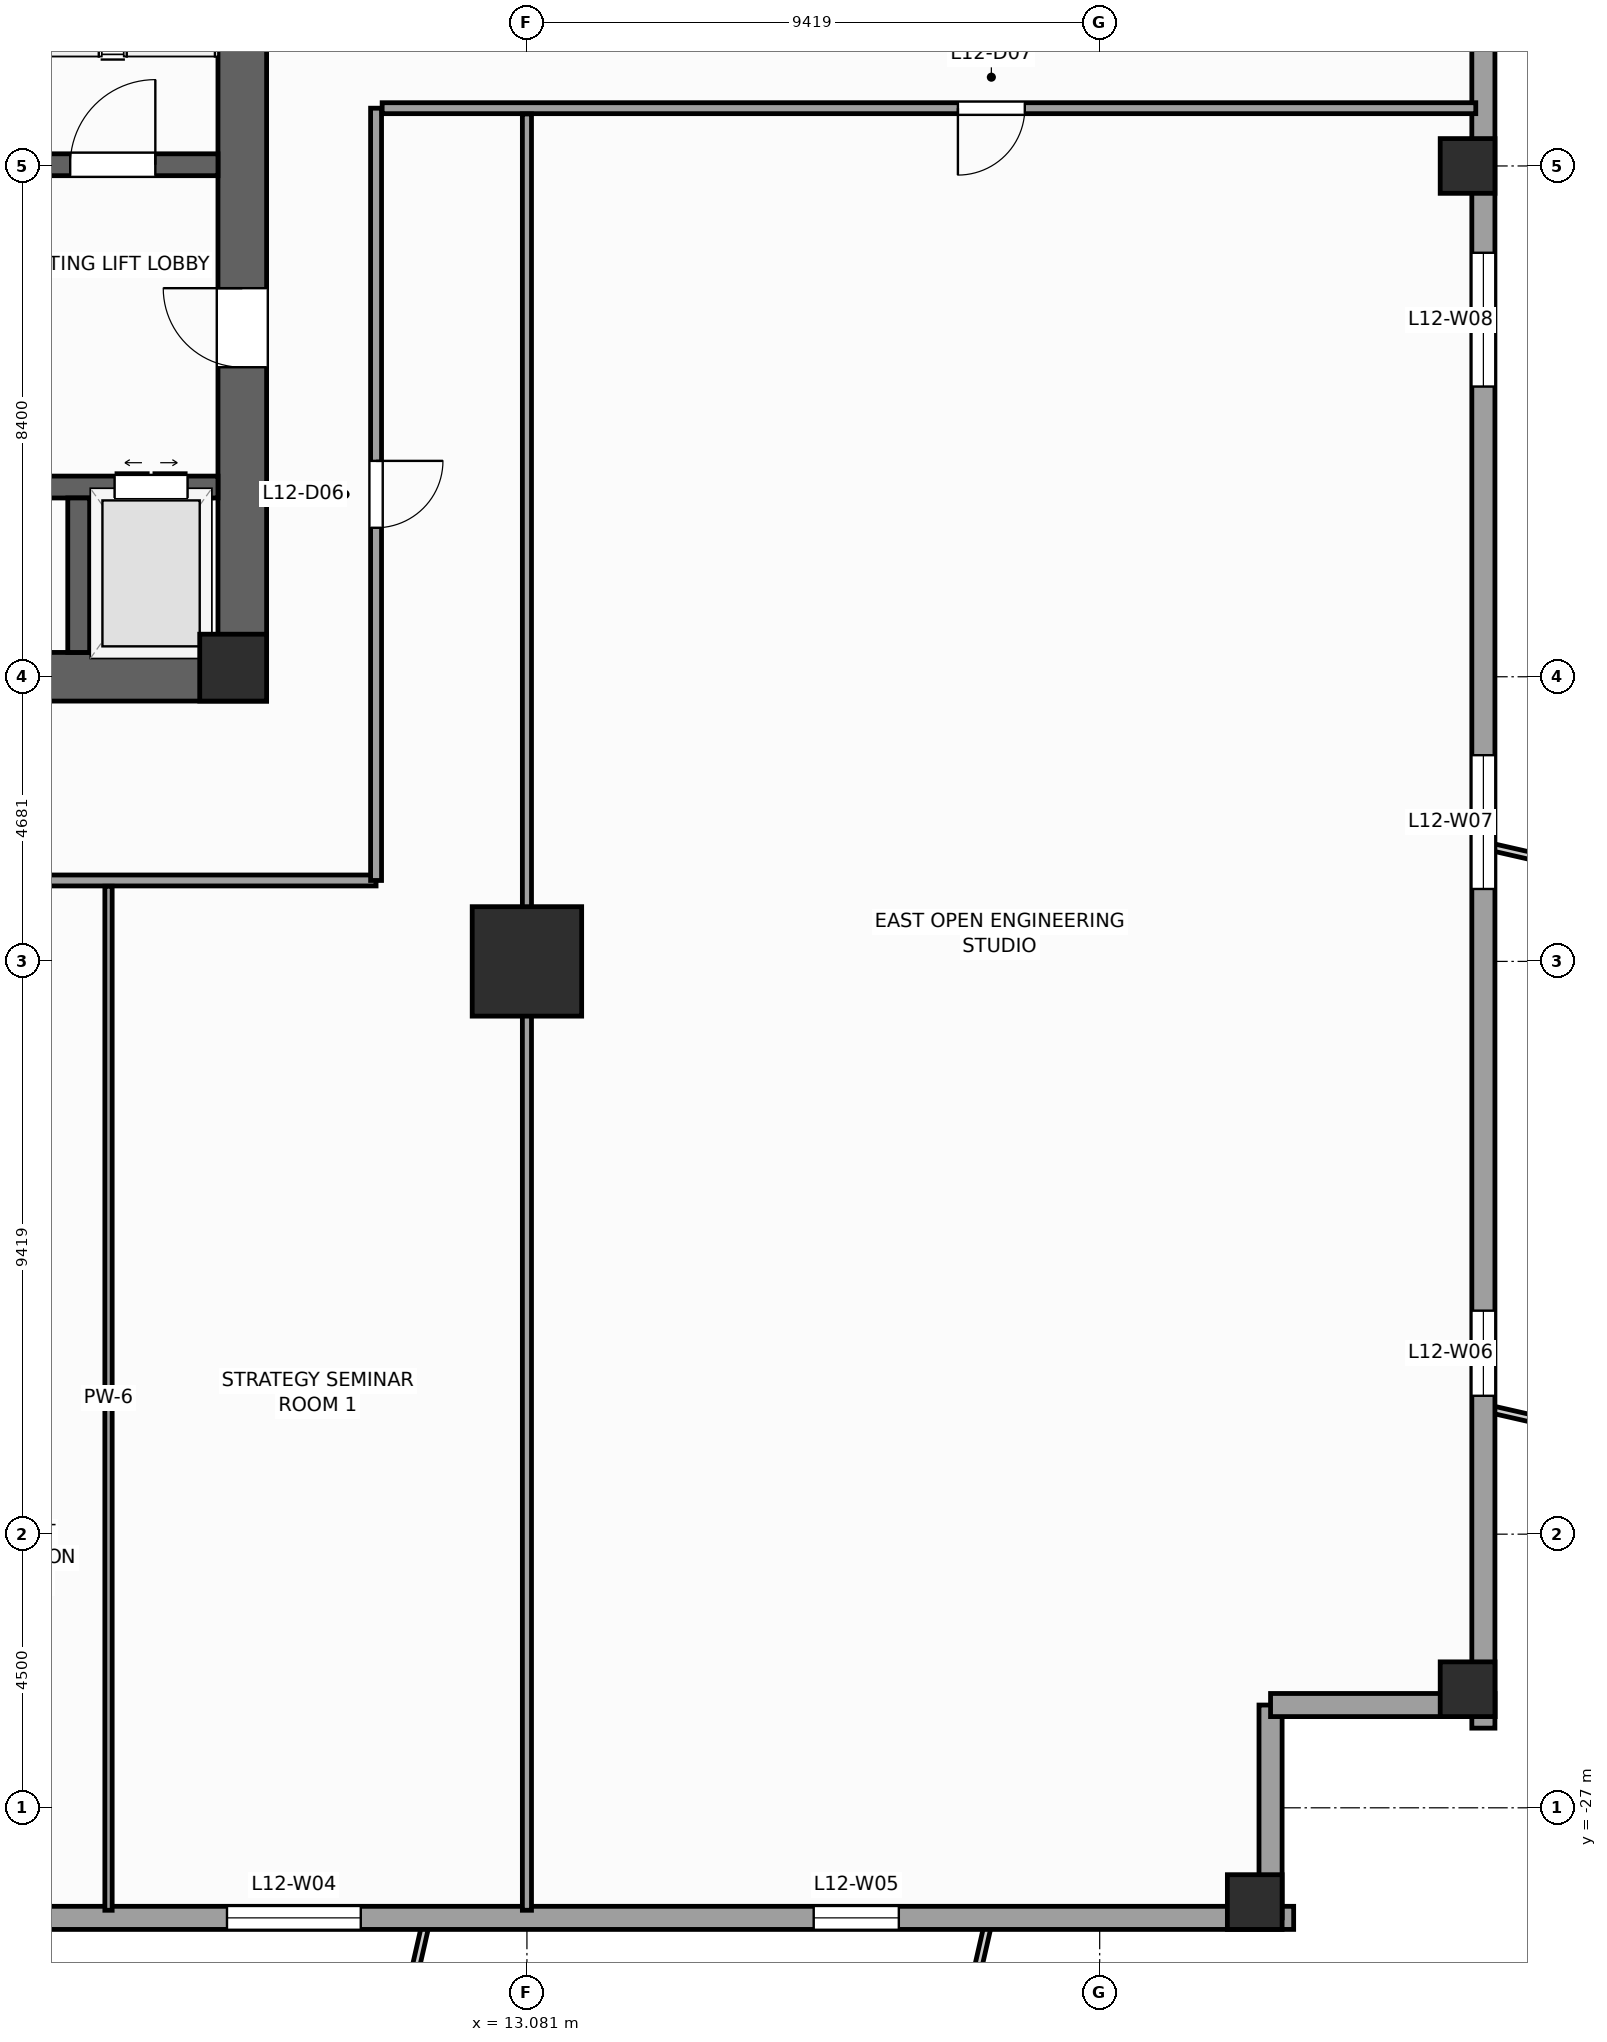
"""IFC4 building model, lengths in metres.
Left out: names, types, materials, properties, quantities, classifications, styles, units other than length and angle.
Written with IfcOpenShell. Run it as: python <this file> out.ifc"""

import sys

from ifc_helpers import new_model, si_unit, direction, frame, frame_2d, origin, origin_2d, place, context, subcontext, project, spatial, rectangle, extrude, source, transform, mapped, element, fill, save


model = new_model("IFC4")
c1 = context("Model", 3, precision=1e-05, world=origin(), true_north=direction((0.0, 1.0)))
c2 = subcontext(c1, "Body", "Model", "MODEL_VIEW")
j1 = project(units=[si_unit("LENGTHUNIT", "METRE"), si_unit("PLANEANGLEUNIT", "RADIAN")], contexts=[c1])
p1 = place(None, origin())
s1 = spatial("IfcSite", under=j1, at=p1, CompositionType="ELEMENT")
p2 = place(p1, origin())
s2 = spatial("IfcBuilding", under=s1, at=p2, CompositionType="ELEMENT")
p3 = place(p2, frame((0.0, 0.0, 54.0)))
s3 = spatial("IfcBuildingStorey", under=s2, at=p3, CompositionType="ELEMENT", Elevation=54.0)
p4 = place(p3, frame((-8.8, -8.4, 0.0), z_axis=(0.0, 0.0, 1.0), x_axis=(1.0, 0.0, 0.0)))
e1 = element("IfcWall", 1, at=p4, inside=s3, PredefinedType="SHEAR", context=c2, shape_type="SweptSolid", body=[
    extrude(rectangle(XDim=17.6, YDim=0.8, at=frame_2d((8.8, 0.0))), origin(), (0.0, 0.0, 1.0), 4.0),
])
p5 = place(p4, frame((8.15, 0.0, 0.0)))
e2 = element("IfcOpeningElement", 2, at=p5, cuts=e1, PredefinedType="OPENING", context=c2, shape_type="SweptSolid", body=[
    extrude(rectangle(XDim=1.3, YDim=2.2, at=frame_2d((0.65, 1.1))), frame((0.0, 0.41, 0.0), z_axis=(0.0, -1.0, 0.0), x_axis=(1.0, 0.0, 0.0)), (0.0, 0.0, 1.0), 0.82),
])
p6 = place(p3, frame((8.4, -8.0, 0.0), z_axis=(0.0, 0.0, 1.0), x_axis=(0.0, 1.0, 0.0)))
e3 = element("IfcWall", 3, at=p6, inside=s3, PredefinedType="SHEAR", context=c2, shape_type="SweptSolid", body=[
    extrude(rectangle(XDim=16.0, YDim=0.8, at=frame_2d((8.0, 0.0))), origin(), (0.0, 0.0, 1.0), 4.0),
])
p7 = place(p6, frame((4.69, 0.0, 0.0)))
e4 = element("IfcOpeningElement", 4, at=p7, cuts=e3, PredefinedType="OPENING", context=c2, shape_type="SweptSolid", body=[
    extrude(rectangle(XDim=1.3, YDim=2.2, at=frame_2d((0.65, 1.1))), frame((0.0, 0.41, 0.0), z_axis=(0.0, -1.0, 0.0), x_axis=(1.0, 0.0, 0.0)), (0.0, 0.0, 1.0), 0.82),
])
p8 = place(p3, frame((4.54, 0.02, 0.0), z_axis=(0.0, 0.0, 1.0), x_axis=(1.0, 0.0, 0.0)))
e5 = element("IfcWall", 5, at=p8, inside=s3, PredefinedType="SHEAR", context=c2, shape_type="SweptSolid", body=[
    extrude(rectangle(XDim=3.46, YDim=0.36, at=frame_2d((1.73, 0.0))), origin(), (0.0, 0.0, 1.0), 4.0),
])
p9 = place(p8, frame((1.03, 0.0, 0.0)))
e6 = element("IfcOpeningElement", 6, at=p9, cuts=e5, PredefinedType="OPENING", context=c2, shape_type="SweptSolid", body=[
    extrude(rectangle(XDim=1.4, YDim=2.2, at=frame_2d((0.7, 1.1))), frame((0.0, 0.19, 0.0), z_axis=(0.0, -1.0, 0.0), x_axis=(1.0, 0.0, 0.0)), (0.0, 0.0, 1.0), 0.38),
])
p10 = place(p3, frame((4.54, -5.28, 0.0), z_axis=(0.0, 0.0, 1.0), x_axis=(1.0, 0.0, 0.0)))
e7 = element("IfcWall", 7, at=p10, inside=s3, PredefinedType="SHEAR", context=c2, shape_type="SweptSolid", body=[
    extrude(rectangle(XDim=3.46, YDim=0.36, at=frame_2d((1.73, 0.0))), origin(), (0.0, 0.0, 1.0), 4.0),
])
p11 = place(p10, frame((1.76, 0.0, 0.0)))
e8 = element("IfcOpeningElement", 8, at=p11, cuts=e7, PredefinedType="OPENING", context=c2, shape_type="SweptSolid", body=[
    extrude(rectangle(XDim=1.2, YDim=2.25, at=frame_2d((0.6, 1.125))), frame((0.0, 0.19, 0.0), z_axis=(0.0, -1.0, 0.0), x_axis=(1.0, 0.0, 0.0)), (0.0, 0.0, 1.0), 0.38),
])
p12 = place(p3, frame((5.71, -8.0, 0.0), z_axis=(0.0, 0.0, 1.0), x_axis=(0.0, 1.0, 0.0)))
e9 = element("IfcWall", 9, at=p12, inside=s3, PredefinedType="SHEAR", context=c2, shape_type="SweptSolid", body=[
    extrude(rectangle(XDim=2.54, YDim=0.36, at=frame_2d((1.27, 0.0))), origin(), (0.0, 0.0, 1.0), 4.0),
])
m1 = source(origin(), c2, "Body", "SweptSolid", [
    extrude(rectangle(XDim=1.1, YDim=1.1, at=origin_2d()), origin(), (0.0, 0.0, 1.0), 4.0),
])
p13 = place(p3, frame((8.25, -8.25, 0.0), z_axis=(0.0, 0.0, 1.0), x_axis=(1.0, 0.0, 0.0)))
e10 = element("IfcColumn", 10, at=p13, inside=s3, PredefinedType="PILASTER", context=c2, shape_type="MappedRepresentation", body=[
    mapped(m1, transform((0.0, 0.0, 0.0), scale=1.0)),
])
m2 = source(origin(), c2, "Body", "SweptSolid", [
    extrude(rectangle(XDim=1.8, YDim=1.8, at=origin_2d()), origin(), (0.0, 0.0, 1.0), 4.0),
])
p14 = place(p3, frame((13.081, -13.081, 0.0), z_axis=(0.0, 0.0, 1.0), x_axis=(1.0, 0.0, 0.0)))
e11 = element("IfcColumn", 11, at=p14, inside=s3, PredefinedType="COLUMN", context=c2, shape_type="MappedRepresentation", body=[
    mapped(m2, transform((0.0, 0.0, 0.0), scale=1.0)),
])
m3 = source(origin(), c2, "Body", "SweptSolid", [
    extrude(rectangle(XDim=0.9, YDim=0.9, at=origin_2d()), origin(), (0.0, 0.0, 1.0), 4.0),
])
for number, where, z_axis, x_axis in (
    (12, (25.05, -28.55, 0.0), (0.0, 0.0, 1.0), (1.0, 0.0, 0.0)),
    (13, (28.55, -25.05, 0.0), (0.0, 0.0, 1.0), (1.0, 0.0, 0.0)),
    (14, (28.55, 0.0, 0.0), (0.0, 0.0, 1.0), (1.0, 0.0, 0.0)),
):
    element("IfcColumn", number, at=place(p3, frame(where, z_axis=z_axis, x_axis=x_axis)), inside=s3, PredefinedType="COLUMN", context=c2, shape_type="MappedRepresentation", body=[
        mapped(m3, transform((0.0, 0.0, 0.0), scale=1.0)),
    ])
p15 = place(p3, frame((-25.69, -28.81, 0.0), z_axis=(0.0, 0.0, 1.0), x_axis=(1.0, 0.0, 0.0)))
e15 = element("IfcWall", 15, at=p15, inside=s3, PredefinedType="STANDARD", context=c2, shape_type="SweptSolid", body=[
    extrude(rectangle(XDim=51.38, YDim=0.38, at=frame_2d((25.69, 0.0))), origin(), (0.0, 0.0, 1.0), 3.12),
])
p16 = place(p15, frame((18.715, 0.0, 0.0)))
e16 = element("IfcOpeningElement", 16, at=p16, cuts=e15, PredefinedType="OPENING", context=c2, shape_type="SweptSolid", body=[
    extrude(rectangle(XDim=1.05, YDim=2.25, at=frame_2d((0.525, 1.125))), frame((0.0, 0.2, 0.0), z_axis=(0.0, -1.0, 0.0), x_axis=(1.0, 0.0, 0.0)), (0.0, 0.0, 1.0), 0.4),
])
p17 = place(p15, frame((5.466, 0.0, 0.49)))
e17 = element("IfcOpeningElement", 17, at=p17, cuts=e15, PredefinedType="OPENING", context=c2, shape_type="SweptSolid", body=[
    extrude(rectangle(XDim=1.4, YDim=2.4, at=frame_2d((0.7, 1.2))), frame((0.0, 0.2, 0.0), z_axis=(0.0, -1.0, 0.0), x_axis=(1.0, 0.0, 0.0)), (0.0, 0.0, 1.0), 0.4),
])
p18 = place(p15, frame((13.8, 0.0, 0.49)))
e18 = element("IfcOpeningElement", 18, at=p18, cuts=e15, PredefinedType="OPENING", context=c2, shape_type="SweptSolid", body=[
    extrude(rectangle(XDim=2.2, YDim=2.4, at=frame_2d((1.1, 1.2))), frame((0.0, 0.2, 0.0), z_axis=(0.0, -1.0, 0.0), x_axis=(1.0, 0.0, 0.0)), (0.0, 0.0, 1.0), 0.4),
])
p19 = place(p15, frame((22.062, 0.0, 0.49)))
e19 = element("IfcOpeningElement", 19, at=p19, cuts=e15, PredefinedType="OPENING", context=c2, shape_type="SweptSolid", body=[
    extrude(rectangle(XDim=2.2, YDim=2.4, at=frame_2d((1.1, 1.2))), frame((0.0, 0.2, 0.0), z_axis=(0.0, -1.0, 0.0), x_axis=(1.0, 0.0, 0.0)), (0.0, 0.0, 1.0), 0.4),
])
p20 = place(p15, frame((33.838, 0.0, 0.49)))
e20 = element("IfcOpeningElement", 20, at=p20, cuts=e15, PredefinedType="OPENING", context=c2, shape_type="SweptSolid", body=[
    extrude(rectangle(XDim=2.2, YDim=2.4, at=frame_2d((1.1, 1.2))), frame((0.0, 0.2, 0.0), z_axis=(0.0, -1.0, 0.0), x_axis=(1.0, 0.0, 0.0)), (0.0, 0.0, 1.0), 0.4),
])
p21 = place(p15, frame((43.487, 0.0, 0.49)))
e21 = element("IfcOpeningElement", 21, at=p21, cuts=e15, PredefinedType="OPENING", context=c2, shape_type="SweptSolid", body=[
    extrude(rectangle(XDim=1.4, YDim=2.4, at=frame_2d((0.7, 1.2))), frame((0.0, 0.2, 0.0), z_axis=(0.0, -1.0, 0.0), x_axis=(1.0, 0.0, 0.0)), (0.0, 0.0, 1.0), 0.4),
])
p22 = place(p3, frame((25.31, -28.81, 0.0), z_axis=(0.0, 0.0, 1.0), x_axis=(0.0, 1.0, 0.0)))
e22 = element("IfcWall", 22, at=p22, inside=s3, PredefinedType="STANDARD", context=c2, shape_type="SweptSolid", body=[
    extrude(rectangle(XDim=3.5, YDim=0.38, at=frame_2d((1.75, 0.0))), origin(), (0.0, 0.0, 1.0), 3.72),
])
p23 = place(p3, frame((25.31, -25.31, 0.0), z_axis=(0.0, 0.0, 1.0), x_axis=(1.0, 0.0, 0.0)))
e23 = element("IfcWall", 23, at=p23, inside=s3, PredefinedType="STANDARD", context=c2, shape_type="SweptSolid", body=[
    extrude(rectangle(XDim=3.69, YDim=0.38, at=frame_2d((1.845, 0.0))), origin(), (0.0, 0.0, 1.0), 3.72),
])
p24 = place(p3, frame((28.81, -25.69, 0.0), z_axis=(0.0, 0.0, 1.0), x_axis=(0.0, 1.0, 0.0)))
e24 = element("IfcWall", 24, at=p24, inside=s3, PredefinedType="STANDARD", context=c2, shape_type="SweptSolid", body=[
    extrude(rectangle(XDim=51.38, YDim=0.38, at=frame_2d((25.69, 0.0))), origin(), (0.0, 0.0, 1.0), 3.12),
])
p25 = place(p24, frame((5.466, 0.0, 0.49)))
e25 = element("IfcOpeningElement", 25, at=p25, cuts=e24, PredefinedType="OPENING", context=c2, shape_type="SweptSolid", body=[
    extrude(rectangle(XDim=1.4, YDim=2.4, at=frame_2d((0.7, 1.2))), frame((0.0, 0.2, 0.0), z_axis=(0.0, -1.0, 0.0), x_axis=(1.0, 0.0, 0.0)), (0.0, 0.0, 1.0), 0.4),
])
p26 = place(p24, frame((13.8, 0.0, 0.49)))
e26 = element("IfcOpeningElement", 26, at=p26, cuts=e24, PredefinedType="OPENING", context=c2, shape_type="SweptSolid", body=[
    extrude(rectangle(XDim=2.2, YDim=2.4, at=frame_2d((1.1, 1.2))), frame((0.0, 0.2, 0.0), z_axis=(0.0, -1.0, 0.0), x_axis=(1.0, 0.0, 0.0)), (0.0, 0.0, 1.0), 0.4),
])
p27 = place(p24, frame((22.062, 0.0, 0.49)))
e27 = element("IfcOpeningElement", 27, at=p27, cuts=e24, PredefinedType="OPENING", context=c2, shape_type="SweptSolid", body=[
    extrude(rectangle(XDim=2.2, YDim=2.4, at=frame_2d((1.1, 1.2))), frame((0.0, 0.2, 0.0), z_axis=(0.0, -1.0, 0.0), x_axis=(1.0, 0.0, 0.0)), (0.0, 0.0, 1.0), 0.4),
])
p28 = place(p24, frame((33.838, 0.0, 0.49)))
e28 = element("IfcOpeningElement", 28, at=p28, cuts=e24, PredefinedType="OPENING", context=c2, shape_type="SweptSolid", body=[
    extrude(rectangle(XDim=2.2, YDim=2.4, at=frame_2d((1.1, 1.2))), frame((0.0, 0.2, 0.0), z_axis=(0.0, -1.0, 0.0), x_axis=(1.0, 0.0, 0.0)), (0.0, 0.0, 1.0), 0.4),
])
p29 = place(p24, frame((43.487, 0.0, 0.49)))
e29 = element("IfcOpeningElement", 29, at=p29, cuts=e24, PredefinedType="OPENING", context=c2, shape_type="SweptSolid", body=[
    extrude(rectangle(XDim=1.4, YDim=2.4, at=frame_2d((0.7, 1.2))), frame((0.0, 0.2, 0.0), z_axis=(0.0, -1.0, 0.0), x_axis=(1.0, 0.0, 0.0)), (0.0, 0.0, 1.0), 0.4),
])
p30 = place(p3, frame((3.25, -11.75, 0.0), z_axis=(0.0, 0.0, 1.0), x_axis=(1.0, 0.0, 0.0)))
e30 = element("IfcWall", 30, at=p30, inside=s3, PredefinedType="PARTITIONING", context=c2, shape_type="SweptSolid", body=[
    extrude(rectangle(XDim=7.35, YDim=0.18, at=frame_2d((3.675, 0.0))), origin(), (0.0, 0.0, 1.0), 3.72),
])
p31 = place(p3, frame((10.6, -11.75, 0.0), z_axis=(0.0, 0.0, 1.0), x_axis=(0.0, 1.0, 0.0)))
e31 = element("IfcWall", 31, at=p31, inside=s3, PredefinedType="PARTITIONING", context=c2, shape_type="SweptSolid", body=[
    extrude(rectangle(XDim=12.7, YDim=0.18, at=frame_2d((6.35, 0.0))), origin(), (0.0, 0.0, 1.0), 3.72),
])
p32 = place(p31, frame((5.8, 0.0, 0.0)))
e32 = element("IfcOpeningElement", 32, at=p32, cuts=e31, PredefinedType="OPENING", context=c2, shape_type="SweptSolid", body=[
    extrude(rectangle(XDim=1.1, YDim=2.2, at=frame_2d((0.55, 1.1))), frame((0.0, 0.1, 0.0), z_axis=(0.0, -1.0, 0.0), x_axis=(1.0, 0.0, 0.0)), (0.0, 0.0, 1.0), 0.2),
])
p33 = place(p3, frame((10.7, 0.95, 0.0), z_axis=(0.0, 0.0, 1.0), x_axis=(1.0, 0.0, 0.0)))
e33 = element("IfcWall", 33, at=p33, inside=s3, PredefinedType="PARTITIONING", context=c2, shape_type="SweptSolid", body=[
    extrude(rectangle(XDim=17.985, YDim=0.18, at=frame_2d((8.993, 0.0))), origin(), (0.0, 0.0, 1.0), 3.72),
])
p34 = place(p33, frame((9.469, 0.0, 0.0)))
e34 = element("IfcOpeningElement", 34, at=p34, cuts=e33, PredefinedType="OPENING", context=c2, shape_type="SweptSolid", body=[
    extrude(rectangle(XDim=1.1, YDim=2.2, at=frame_2d((0.55, 1.1))), frame((0.0, 0.1, 0.0), z_axis=(0.0, -1.0, 0.0), x_axis=(1.0, 0.0, 0.0)), (0.0, 0.0, 1.0), 0.2),
])
p35 = place(p3, frame((6.2, -28.685, 0.0), z_axis=(0.0, 0.0, 1.0), x_axis=(0.0, 1.0, 0.0)))
e35 = element("IfcWall", 35, at=p35, inside=s3, PredefinedType="PARTITIONING", context=c2, shape_type="SweptSolid", body=[
    extrude(rectangle(XDim=16.84, YDim=0.12, at=frame_2d((8.42, 0.0))), origin(), (0.0, 0.0, 1.0), 3.72),
])
p36 = place(p3, frame((13.081, -28.685, 0.0), z_axis=(0.0, 0.0, 1.0), x_axis=(0.0, 1.0, 0.0)))
e36 = element("IfcWall", 36, at=p36, inside=s3, PredefinedType="PARTITIONING", context=c2, shape_type="SweptSolid", body=[
    extrude(rectangle(XDim=29.54, YDim=0.15, at=frame_2d((14.77, 0.0))), origin(), (0.0, 0.0, 1.0), 2.712),
])
m4 = source(origin(), c2, "Body", "SweptSolid", [
    extrude(rectangle(XDim=2.2, YDim=2.4, at=frame_2d((1.1, 1.2))), frame((0.0, 0.03, 0.0), z_axis=(0.0, -1.0, 0.0), x_axis=(1.0, 0.0, 0.0)), (0.0, 0.0, 1.0), 0.06),
])
p37 = place(p20, origin())
e37 = element("IfcWindow", 37, at=p37, inside=s3, PartitioningType="SINGLE_PANEL", PredefinedType="WINDOW", context=c2, shape_type="MappedRepresentation", body=[
    mapped(m4, transform((0.0, 0.0, 0.0), scale=1.0)),
])
fill(e20, e37)
m5 = source(origin(), c2, "Body", "SweptSolid", [
    extrude(rectangle(XDim=1.4, YDim=2.4, at=frame_2d((0.7, 1.2))), frame((0.0, 0.03, 0.0), z_axis=(0.0, -1.0, 0.0), x_axis=(1.0, 0.0, 0.0)), (0.0, 0.0, 1.0), 0.06),
])
p38 = place(p21, origin())
e38 = element("IfcWindow", 38, at=p38, inside=s3, PartitioningType="SINGLE_PANEL", PredefinedType="WINDOW", context=c2, shape_type="MappedRepresentation", body=[
    mapped(m5, transform((0.0, 0.0, 0.0), scale=1.0)),
])
fill(e21, e38)
p39 = place(p25, origin())
e39 = element("IfcWindow", 39, at=p39, inside=s3, PartitioningType="SINGLE_PANEL", PredefinedType="WINDOW", context=c2, shape_type="MappedRepresentation", body=[
    mapped(m5, transform((0.0, 0.0, 0.0), scale=1.0)),
])
fill(e25, e39)
p40 = place(p26, origin())
e40 = element("IfcWindow", 40, at=p40, inside=s3, PartitioningType="SINGLE_PANEL", PredefinedType="WINDOW", context=c2, shape_type="MappedRepresentation", body=[
    mapped(m4, transform((0.0, 0.0, 0.0), scale=1.0)),
])
fill(e26, e40)
p41 = place(p27, origin())
e41 = element("IfcWindow", 41, at=p41, inside=s3, PartitioningType="SINGLE_PANEL", PredefinedType="WINDOW", context=c2, shape_type="MappedRepresentation", body=[
    mapped(m4, transform((0.0, 0.0, 0.0), scale=1.0)),
])
fill(e27, e41)
m6 = source(origin(), c2, "Body", "SweptSolid", [
    extrude(rectangle(XDim=1.4, YDim=2.2, at=frame_2d((0.7, 1.1))), frame((0.0, 0.025, 0.0), z_axis=(0.0, -1.0, 0.0), x_axis=(1.0, 0.0, 0.0)), (0.0, 0.0, 1.0), 0.05),
])
p42 = place(p9, origin())
e42 = element("IfcDoor", 42, at=p42, inside=s3, OperationType="SINGLE_SWING_RIGHT", PredefinedType="DOOR", context=c2, shape_type="MappedRepresentation", body=[
    mapped(m6, transform((0.0, 0.0, 0.0), scale=1.0)),
])
fill(e6, e42)
m7 = source(origin(), c2, "Body", "SweptSolid", [
    extrude(rectangle(XDim=1.3, YDim=2.2, at=frame_2d((0.65, 1.1))), frame((0.0, 0.025, 0.0), z_axis=(0.0, -1.0, 0.0), x_axis=(1.0, 0.0, 0.0)), (0.0, 0.0, 1.0), 0.05),
])
p43 = place(p7, origin())
e43 = element("IfcDoor", 43, at=p43, inside=s3, OperationType="SINGLE_SWING_RIGHT", PredefinedType="DOOR", context=c2, shape_type="MappedRepresentation", body=[
    mapped(m7, transform((0.0, 0.0, 0.0), scale=1.0)),
])
fill(e4, e43)
m8 = source(origin(), c2, "Body", "SweptSolid", [
    extrude(rectangle(XDim=1.2, YDim=2.25, at=frame_2d((0.6, 1.125))), frame((0.0, 0.025, 0.0), z_axis=(0.0, -1.0, 0.0), x_axis=(1.0, 0.0, 0.0)), (0.0, 0.0, 1.0), 0.05),
])
p44 = place(p11, origin())
e44 = element("IfcDoor", 44, at=p44, inside=s3, OperationType="DOUBLE_DOOR_SLIDING", PredefinedType="DOOR", context=c2, shape_type="MappedRepresentation", body=[
    mapped(m8, transform((0.0, 0.0, 0.0), scale=1.0)),
])
fill(e8, e44)
m9 = source(origin(), c2, "Body", "SweptSolid", [
    extrude(rectangle(XDim=1.1, YDim=2.2, at=frame_2d((0.55, 1.1))), frame((0.0, 0.025, 0.0), z_axis=(0.0, -1.0, 0.0), x_axis=(1.0, 0.0, 0.0)), (0.0, 0.0, 1.0), 0.05),
])
p45 = place(p32, frame((1.1, 0.0, 0.0), z_axis=(0.0, 0.0, 1.0), x_axis=(-1.0, 0.0, 0.0)))
e45 = element("IfcDoor", 45, at=p45, inside=s3, OperationType="SINGLE_SWING_RIGHT", PredefinedType="DOOR", context=c2, shape_type="MappedRepresentation", body=[
    mapped(m9, transform((0.0, 0.0, 0.0), scale=1.0)),
])
fill(e32, e45)
p46 = place(p34, frame((1.1, 0.0, 0.0), z_axis=(0.0, 0.0, 1.0), x_axis=(-1.0, 0.0, 0.0)))
e46 = element("IfcDoor", 46, at=p46, inside=s3, OperationType="SINGLE_SWING_LEFT", PredefinedType="DOOR", context=c2, shape_type="MappedRepresentation", body=[
    mapped(m9, transform((0.0, 0.0, 0.0), scale=1.0)),
])
fill(e34, e46)
save(model, sys.argv[1])
